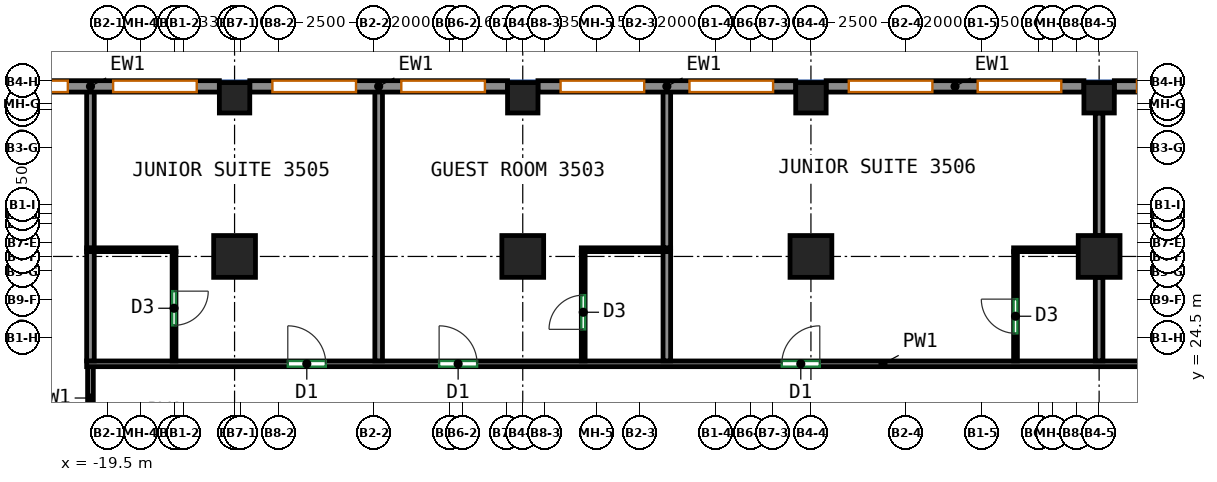
"""IFC4 building model, lengths in metres.
Left out: names, types, materials, properties, quantities, classifications, styles, units other than length and angle.
Written with IfcOpenShell. Run it as: python <this file> out.ifc"""

import sys

from ifc_helpers import new_model, si_unit, direction, frame, frame_2d, origin, origin_2d, place, context, subcontext, project, spatial, rectangle, extrude, source, transform, mapped, element, fill, save


model = new_model("IFC4")
c1 = context("Model", 3, precision=1e-05, world=origin(), true_north=direction((0.0, 1.0)))
c2 = subcontext(c1, "Body", "Model", "MODEL_VIEW")
j1 = project(units=[si_unit("LENGTHUNIT", "METRE"), si_unit("PLANEANGLEUNIT", "RADIAN")], contexts=[c1])
p1 = place(None, origin())
s1 = spatial("IfcSite", under=j1, at=p1, CompositionType="ELEMENT")
p2 = place(p1, origin())
s2 = spatial("IfcBuilding", under=s1, at=p2, CompositionType="ELEMENT")
p3 = place(p2, frame((0.0, 0.0, 154.1)))
s3 = spatial("IfcBuildingStorey", under=s2, at=p3, CompositionType="ELEMENT", Elevation=154.1)
m1 = source(origin(), c2, "Body", "SweptSolid", [
    extrude(rectangle(XDim=1.1, YDim=1.1, at=origin_2d()), origin(), (0.0, 0.0, 1.0), 3.12),
])
p4 = place(p3, frame((-16.167, 26.625, 0.0), z_axis=(0.0, 0.0, 1.0), x_axis=(1.0, 0.0, 0.0)))
e1 = element("IfcColumn", 1, at=p4, inside=s3, PredefinedType="COLUMN", context=c2, shape_type="MappedRepresentation", body=[
    mapped(m1, transform((0.0, 0.0, 0.0))),
])
m2 = source(origin(), c2, "Body", "SweptSolid", [
    extrude(rectangle(XDim=0.8, YDim=0.8, at=origin_2d()), origin(), (0.0, 0.0, 1.0), 3.12),
])
p5 = place(p3, frame((-16.167, 30.8, 0.0), z_axis=(0.0, 0.0, 1.0), x_axis=(1.0, 0.0, 0.0)))
e2 = element("IfcColumn", 2, at=p5, inside=s3, PredefinedType="COLUMN", context=c2, shape_type="MappedRepresentation", body=[
    mapped(m2, transform((0.0, 0.0, 0.0))),
])
p6 = place(p3, frame((-8.583, 26.625, 0.0), z_axis=(0.0, 0.0, 1.0), x_axis=(1.0, 0.0, 0.0)))
e3 = element("IfcColumn", 3, at=p6, inside=s3, PredefinedType="COLUMN", context=c2, shape_type="MappedRepresentation", body=[
    mapped(m1, transform((0.0, 0.0, 0.0))),
])
p7 = place(p3, frame((-8.583, 30.8, 0.0), z_axis=(0.0, 0.0, 1.0), x_axis=(1.0, 0.0, 0.0)))
e4 = element("IfcColumn", 4, at=p7, inside=s3, PredefinedType="COLUMN", context=c2, shape_type="MappedRepresentation", body=[
    mapped(m2, transform((0.0, 0.0, 0.0))),
])
p8 = place(p3, frame((-1.0, 26.625, 0.0), z_axis=(0.0, 0.0, 1.0), x_axis=(1.0, 0.0, 0.0)))
e5 = element("IfcColumn", 5, at=p8, inside=s3, PredefinedType="COLUMN", context=c2, shape_type="MappedRepresentation", body=[
    mapped(m1, transform((0.0, 0.0, 0.0))),
])
p9 = place(p3, frame((-1.0, 30.8, 0.0), z_axis=(0.0, 0.0, 1.0), x_axis=(1.0, 0.0, 0.0)))
e6 = element("IfcColumn", 6, at=p9, inside=s3, PredefinedType="COLUMN", context=c2, shape_type="MappedRepresentation", body=[
    mapped(m2, transform((0.0, 0.0, 0.0))),
])
p10 = place(p3, frame((6.583, 26.625, 0.0), z_axis=(0.0, 0.0, 1.0), x_axis=(1.0, 0.0, 0.0)))
e7 = element("IfcColumn", 7, at=p10, inside=s3, PredefinedType="COLUMN", context=c2, shape_type="MappedRepresentation", body=[
    mapped(m1, transform((0.0, 0.0, 0.0))),
])
p11 = place(p3, frame((6.583, 30.8, 0.0), z_axis=(0.0, 0.0, 1.0), x_axis=(1.0, 0.0, 0.0)))
e8 = element("IfcColumn", 8, at=p11, inside=s3, PredefinedType="COLUMN", context=c2, shape_type="MappedRepresentation", body=[
    mapped(m2, transform((0.0, 0.0, 0.0))),
])
m3 = source(origin(), c2, "Body", "SweptSolid", [
    extrude(rectangle(XDim=6.783, YDim=0.3, at=frame_2d((3.392, 0.0))), origin(), (0.0, 0.0, 1.0), 3.12),
])
p12 = place(p3, frame((13.767, 31.1, 0.0), z_axis=(0.0, 0.0, 1.0), x_axis=(-1.0, 0.0, 0.0)))
e9 = element("IfcWall", 9, at=p12, inside=s3, PredefinedType="SOLIDWALL", context=c2, shape_type="MappedRepresentation", body=[
    mapped(m3, transform((0.0, 0.0, 0.0))),
])
p13 = place(p12, frame((0.596, 0.0, 0.85)))
e10 = element("IfcOpeningElement", 10, at=p13, cuts=e9, PredefinedType="OPENING", context=c2, shape_type="SweptSolid", body=[
    extrude(rectangle(XDim=2.2, YDim=1.95, at=frame_2d((1.1, 0.975))), frame((0.0, 0.16, 0.0), z_axis=(0.0, -1.0, 0.0), x_axis=(1.0, 0.0, 0.0)), (0.0, 0.0, 1.0), 0.32),
])
p14 = place(p12, frame((3.988, 0.0, 0.85)))
e11 = element("IfcOpeningElement", 11, at=p14, cuts=e9, PredefinedType="OPENING", context=c2, shape_type="SweptSolid", body=[
    extrude(rectangle(XDim=2.2, YDim=1.95, at=frame_2d((1.1, 0.975))), frame((0.0, 0.16, 0.0), z_axis=(0.0, -1.0, 0.0), x_axis=(1.0, 0.0, 0.0)), (0.0, 0.0, 1.0), 0.32),
])
m4 = source(origin(), c2, "Body", "SweptSolid", [
    extrude(rectangle(XDim=6.783, YDim=0.3, at=frame_2d((3.392, 0.0))), origin(), (0.0, 0.0, 1.0), 3.12),
])
p15 = place(p3, frame((6.183, 31.1, 0.0), z_axis=(0.0, 0.0, 1.0), x_axis=(-1.0, 0.0, 0.0)))
e12 = element("IfcWall", 12, at=p15, inside=s3, PredefinedType="SOLIDWALL", context=c2, shape_type="MappedRepresentation", body=[
    mapped(m4, transform((0.0, 0.0, 0.0))),
])
p16 = place(p15, frame((0.596, 0.0, 0.85)))
e13 = element("IfcOpeningElement", 13, at=p16, cuts=e12, PredefinedType="OPENING", context=c2, shape_type="SweptSolid", body=[
    extrude(rectangle(XDim=2.2, YDim=1.95, at=frame_2d((1.1, 0.975))), frame((0.0, 0.16, 0.0), z_axis=(0.0, -1.0, 0.0), x_axis=(1.0, 0.0, 0.0)), (0.0, 0.0, 1.0), 0.32),
])
p17 = place(p15, frame((3.988, 0.0, 0.85)))
e14 = element("IfcOpeningElement", 14, at=p17, cuts=e12, PredefinedType="OPENING", context=c2, shape_type="SweptSolid", body=[
    extrude(rectangle(XDim=2.2, YDim=1.95, at=frame_2d((1.1, 0.975))), frame((0.0, 0.16, 0.0), z_axis=(0.0, -1.0, 0.0), x_axis=(1.0, 0.0, 0.0)), (0.0, 0.0, 1.0), 0.32),
])
p18 = place(p3, frame((-1.4, 31.1, 0.0), z_axis=(0.0, 0.0, 1.0), x_axis=(-1.0, 0.0, 0.0)))
e15 = element("IfcWall", 15, at=p18, inside=s3, PredefinedType="SOLIDWALL", context=c2, shape_type="MappedRepresentation", body=[
    mapped(m4, transform((0.0, 0.0, 0.0))),
])
p19 = place(p18, frame((0.596, 0.0, 0.85)))
e16 = element("IfcOpeningElement", 16, at=p19, cuts=e15, PredefinedType="OPENING", context=c2, shape_type="SweptSolid", body=[
    extrude(rectangle(XDim=2.2, YDim=1.95, at=frame_2d((1.1, 0.975))), frame((0.0, 0.16, 0.0), z_axis=(0.0, -1.0, 0.0), x_axis=(1.0, 0.0, 0.0)), (0.0, 0.0, 1.0), 0.32),
])
p20 = place(p18, frame((3.988, 0.0, 0.85)))
e17 = element("IfcOpeningElement", 17, at=p20, cuts=e15, PredefinedType="OPENING", context=c2, shape_type="SweptSolid", body=[
    extrude(rectangle(XDim=2.2, YDim=1.95, at=frame_2d((1.1, 0.975))), frame((0.0, 0.16, 0.0), z_axis=(0.0, -1.0, 0.0), x_axis=(1.0, 0.0, 0.0)), (0.0, 0.0, 1.0), 0.32),
])
p21 = place(p3, frame((-8.983, 31.1, 0.0), z_axis=(0.0, 0.0, 1.0), x_axis=(-1.0, 0.0, 0.0)))
e18 = element("IfcWall", 18, at=p21, inside=s3, PredefinedType="SOLIDWALL", context=c2, shape_type="MappedRepresentation", body=[
    mapped(m3, transform((0.0, 0.0, 0.0))),
])
p22 = place(p21, frame((0.596, 0.0, 0.85)))
e19 = element("IfcOpeningElement", 19, at=p22, cuts=e18, PredefinedType="OPENING", context=c2, shape_type="SweptSolid", body=[
    extrude(rectangle(XDim=2.2, YDim=1.95, at=frame_2d((1.1, 0.975))), frame((0.0, 0.16, 0.0), z_axis=(0.0, -1.0, 0.0), x_axis=(1.0, 0.0, 0.0)), (0.0, 0.0, 1.0), 0.32),
])
p23 = place(p21, frame((3.988, 0.0, 0.85)))
e20 = element("IfcOpeningElement", 20, at=p23, cuts=e18, PredefinedType="OPENING", context=c2, shape_type="SweptSolid", body=[
    extrude(rectangle(XDim=2.2, YDim=1.95, at=frame_2d((1.1, 0.975))), frame((0.0, 0.16, 0.0), z_axis=(0.0, -1.0, 0.0), x_axis=(1.0, 0.0, 0.0)), (0.0, 0.0, 1.0), 0.32),
])
p24 = place(p3, frame((-16.567, 31.1, 0.0), z_axis=(0.0, 0.0, 1.0), x_axis=(-1.0, 0.0, 0.0)))
e21 = element("IfcWall", 21, at=p24, inside=s3, PredefinedType="SOLIDWALL", context=c2, shape_type="MappedRepresentation", body=[
    mapped(m4, transform((0.0, 0.0, 0.0))),
])
p25 = place(p24, frame((0.596, 0.0, 0.85)))
e22 = element("IfcOpeningElement", 22, at=p25, cuts=e21, PredefinedType="OPENING", context=c2, shape_type="SweptSolid", body=[
    extrude(rectangle(XDim=2.2, YDim=1.95, at=frame_2d((1.1, 0.975))), frame((0.0, 0.16, 0.0), z_axis=(0.0, -1.0, 0.0), x_axis=(1.0, 0.0, 0.0)), (0.0, 0.0, 1.0), 0.32),
])
p26 = place(p24, frame((3.988, 0.0, 0.85)))
e23 = element("IfcOpeningElement", 23, at=p26, cuts=e21, PredefinedType="OPENING", context=c2, shape_type="SweptSolid", body=[
    extrude(rectangle(XDim=2.2, YDim=1.95, at=frame_2d((1.1, 0.975))), frame((0.0, 0.16, 0.0), z_axis=(0.0, -1.0, 0.0), x_axis=(1.0, 0.0, 0.0)), (0.0, 0.0, 1.0), 0.32),
])
p27 = place(p3, frame((-19.959, 22.075, 0.0), z_axis=(0.0, 0.0, 1.0), x_axis=(0.0, 1.0, 0.0)))
e24 = element("IfcWall", 24, at=p27, inside=s3, PredefinedType="PARTITIONING", context=c2, shape_type="SweptSolid", body=[
    extrude(rectangle(XDim=1.65, YDim=0.15, at=frame_2d((0.825, 0.0))), origin(), (0.0, 0.0, 1.0), 3.12),
])
p28 = place(p3, frame((-20.059, 23.8, 0.0), z_axis=(0.0, 0.0, 1.0), x_axis=(1.0, 0.0, 0.0)))
e25 = element("IfcWall", 25, at=p28, inside=s3, PredefinedType="PARTITIONING", context=c2, shape_type="SweptSolid", body=[
    extrude(rectangle(XDim=41.909, YDim=0.15, at=frame_2d((20.955, 0.0))), origin(), (0.0, 0.0, 1.0), 3.12),
])
p29 = place(p28, frame((5.293, 0.0, 0.0)))
e26 = element("IfcOpeningElement", 26, at=p29, cuts=e25, PredefinedType="OPENING", context=c2, shape_type="SweptSolid", body=[
    extrude(rectangle(XDim=1.0, YDim=2.1, at=frame_2d((0.5, 1.05))), frame((0.0, 0.085, 0.0), z_axis=(0.0, -1.0, 0.0), x_axis=(1.0, 0.0, 0.0)), (0.0, 0.0, 1.0), 0.17),
])
p30 = place(p28, frame((9.275, 0.0, 0.0)))
e27 = element("IfcOpeningElement", 27, at=p30, cuts=e25, PredefinedType="OPENING", context=c2, shape_type="SweptSolid", body=[
    extrude(rectangle(XDim=1.0, YDim=2.1, at=frame_2d((0.5, 1.05))), frame((0.0, 0.085, 0.0), z_axis=(0.0, -1.0, 0.0), x_axis=(1.0, 0.0, 0.0)), (0.0, 0.0, 1.0), 0.17),
])
p31 = place(p28, frame((18.292, 0.0, 0.0)))
e28 = element("IfcOpeningElement", 28, at=p31, cuts=e25, PredefinedType="OPENING", context=c2, shape_type="SweptSolid", body=[
    extrude(rectangle(XDim=1.0, YDim=2.1, at=frame_2d((0.5, 1.05))), frame((0.0, 0.085, 0.0), z_axis=(0.0, -1.0, 0.0), x_axis=(1.0, 0.0, 0.0)), (0.0, 0.0, 1.0), 0.17),
])
p32 = place(p28, frame((30.636, 0.0, 0.0)))
e29 = element("IfcOpeningElement", 29, at=p32, cuts=e25, PredefinedType="OPENING", context=c2, shape_type="SweptSolid", body=[
    extrude(rectangle(XDim=1.0, YDim=2.1, at=frame_2d((0.5, 1.05))), frame((0.0, 0.085, 0.0), z_axis=(0.0, -1.0, 0.0), x_axis=(1.0, 0.0, 0.0)), (0.0, 0.0, 1.0), 0.17),
])
p33 = place(p28, frame((36.828, 0.0, 0.0)))
e30 = element("IfcOpeningElement", 30, at=p33, cuts=e25, PredefinedType="OPENING", context=c2, shape_type="SweptSolid", body=[
    extrude(rectangle(XDim=1.0, YDim=2.1, at=frame_2d((0.5, 1.05))), frame((0.0, 0.085, 0.0), z_axis=(0.0, -1.0, 0.0), x_axis=(1.0, 0.0, 0.0)), (0.0, 0.0, 1.0), 0.17),
])
p34 = place(p28, frame((38.314, 0.0, 0.0)))
e31 = element("IfcOpeningElement", 31, at=p34, cuts=e25, PredefinedType="OPENING", context=c2, shape_type="SweptSolid", body=[
    extrude(rectangle(XDim=1.0, YDim=2.1, at=frame_2d((0.5, 1.05))), frame((0.0, 0.085, 0.0), z_axis=(0.0, -1.0, 0.0), x_axis=(1.0, 0.0, 0.0)), (0.0, 0.0, 1.0), 0.17),
])
p35 = place(p3, frame((-19.959, 26.842, 0.0), z_axis=(0.0, 0.0, 1.0), x_axis=(0.0, 1.0, 0.0)))
e32 = element("IfcWall", 32, at=p35, inside=s3, PredefinedType="PARTITIONING", context=c2, shape_type="SweptSolid", body=[
    extrude(rectangle(XDim=4.158, YDim=0.2, at=frame_2d((2.079, 0.0))), origin(), (0.0, 0.0, 1.0), 3.12),
])
p36 = place(p3, frame((-19.959, 23.877, 0.0), z_axis=(0.0, 0.0, 1.0), x_axis=(0.0, 1.0, 0.0)))
e33 = element("IfcWall", 33, at=p36, inside=s3, PredefinedType="PARTITIONING", context=c2, shape_type="SweptSolid", body=[
    extrude(rectangle(XDim=2.885, YDim=0.2, at=frame_2d((1.442, 0.0))), origin(), (0.0, 0.0, 1.0), 3.12),
])
p37 = place(p3, frame((-17.759, 26.752, 0.0), z_axis=(0.0, 0.0, 1.0), x_axis=(0.0, -1.0, 0.0)))
e34 = element("IfcWall", 34, at=p37, inside=s3, PredefinedType="PARTITIONING", context=c2, shape_type="SweptSolid", body=[
    extrude(rectangle(XDim=2.875, YDim=0.1, at=frame_2d((1.438, 0.0))), origin(), (0.0, 0.0, 1.0), 3.12),
])
p38 = place(p37, frame((1.04, 0.0, 0.0)))
e35 = element("IfcOpeningElement", 35, at=p38, cuts=e34, PredefinedType="OPENING", context=c2, shape_type="SweptSolid", body=[
    extrude(rectangle(XDim=0.9, YDim=2.1, at=frame_2d((0.45, 1.05))), frame((0.0, 0.06, 0.0), z_axis=(0.0, -1.0, 0.0), x_axis=(1.0, 0.0, 0.0)), (0.0, 0.0, 1.0), 0.12),
])
p39 = place(p3, frame((-20.059, 26.802, 0.0), z_axis=(0.0, 0.0, 1.0), x_axis=(1.0, 0.0, 0.0)))
e36 = element("IfcWall", 36, at=p39, inside=s3, PredefinedType="PARTITIONING", context=c2, shape_type="SweptSolid", body=[
    extrude(rectangle(XDim=2.35, YDim=0.1, at=frame_2d((1.175, 0.0))), origin(), (0.0, 0.0, 1.0), 3.12),
])
p40 = place(p3, frame((-12.375, 23.877, 0.0), z_axis=(0.0, 0.0, 1.0), x_axis=(0.0, 1.0, 0.0)))
e37 = element("IfcWall", 37, at=p40, inside=s3, PredefinedType="PARTITIONING", context=c2, shape_type="SweptSolid", body=[
    extrude(rectangle(XDim=7.123, YDim=0.2, at=frame_2d((3.562, 0.0))), origin(), (0.0, 0.0, 1.0), 3.12),
])
p41 = place(p3, frame((-7.042, 26.802, 0.0), z_axis=(0.0, 0.0, 1.0), x_axis=(1.0, 0.0, 0.0)))
e38 = element("IfcWall", 38, at=p41, inside=s3, PredefinedType="PARTITIONING", context=c2, shape_type="SweptSolid", body=[
    extrude(rectangle(XDim=2.35, YDim=0.1, at=frame_2d((1.175, 0.0))), origin(), (0.0, 0.0, 1.0), 3.12),
])
p42 = place(p3, frame((-6.992, 23.877, 0.0), z_axis=(0.0, 0.0, 1.0), x_axis=(0.0, 1.0, 0.0)))
e39 = element("IfcWall", 39, at=p42, inside=s3, PredefinedType="PARTITIONING", context=c2, shape_type="SweptSolid", body=[
    extrude(rectangle(XDim=2.875, YDim=0.1, at=frame_2d((1.438, 0.0))), origin(), (0.0, 0.0, 1.0), 3.12),
])
p43 = place(p42, frame((0.83, 0.0, 0.0)))
e40 = element("IfcOpeningElement", 40, at=p43, cuts=e39, PredefinedType="OPENING", context=c2, shape_type="SweptSolid", body=[
    extrude(rectangle(XDim=0.9, YDim=2.1, at=frame_2d((0.45, 1.05))), frame((0.0, 0.06, 0.0), z_axis=(0.0, -1.0, 0.0), x_axis=(1.0, 0.0, 0.0)), (0.0, 0.0, 1.0), 0.12),
])
p44 = place(p3, frame((-4.792, 26.852, 0.0), z_axis=(0.0, 0.0, 1.0), x_axis=(0.0, 1.0, 0.0)))
e41 = element("IfcWall", 41, at=p44, inside=s3, PredefinedType="PARTITIONING", context=c2, shape_type="SweptSolid", body=[
    extrude(rectangle(XDim=4.148, YDim=0.2, at=frame_2d((2.074, 0.0))), origin(), (0.0, 0.0, 1.0), 3.12),
])
p45 = place(p3, frame((-4.792, 23.877, 0.0), z_axis=(0.0, 0.0, 1.0), x_axis=(0.0, 1.0, 0.0)))
e42 = element("IfcWall", 42, at=p45, inside=s3, PredefinedType="PARTITIONING", context=c2, shape_type="SweptSolid", body=[
    extrude(rectangle(XDim=2.875, YDim=0.2, at=frame_2d((1.438, 0.0))), origin(), (0.0, 0.0, 1.0), 3.12),
])
p46 = place(p3, frame((4.333, 26.802, 0.0), z_axis=(0.0, 0.0, 1.0), x_axis=(1.0, 0.0, 0.0)))
e43 = element("IfcWall", 43, at=p46, inside=s3, PredefinedType="PARTITIONING", context=c2, shape_type="SweptSolid", body=[
    extrude(rectangle(XDim=1.7, YDim=0.1, at=frame_2d((0.85, 0.0))), origin(), (0.0, 0.0, 1.0), 3.12),
])
p47 = place(p3, frame((4.383, 23.877, 0.0), z_axis=(0.0, 0.0, 1.0), x_axis=(0.0, 1.0, 0.0)))
e44 = element("IfcWall", 44, at=p47, inside=s3, PredefinedType="PARTITIONING", context=c2, shape_type="SweptSolid", body=[
    extrude(rectangle(XDim=2.875, YDim=0.1, at=frame_2d((1.438, 0.0))), origin(), (0.0, 0.0, 1.0), 3.12),
])
p48 = place(p47, frame((0.725, 0.0, 0.0)))
e45 = element("IfcOpeningElement", 45, at=p48, cuts=e44, PredefinedType="OPENING", context=c2, shape_type="SweptSolid", body=[
    extrude(rectangle(XDim=0.9, YDim=2.1, at=frame_2d((0.45, 1.05))), frame((0.0, 0.06, 0.0), z_axis=(0.0, -1.0, 0.0), x_axis=(1.0, 0.0, 0.0)), (0.0, 0.0, 1.0), 0.12),
])
p49 = place(p3, frame((6.583, 27.175, 0.0), z_axis=(0.0, 0.0, 1.0), x_axis=(0.0, 1.0, 0.0)))
e46 = element("IfcWall", 46, at=p49, inside=s3, PredefinedType="PARTITIONING", context=c2, shape_type="SweptSolid", body=[
    extrude(rectangle(XDim=3.225, YDim=0.2, at=frame_2d((1.612, 0.0))), origin(), (0.0, 0.0, 1.0), 3.12),
])
p50 = place(p3, frame((6.583, 23.877, 0.0), z_axis=(0.0, 0.0, 1.0), x_axis=(0.0, 1.0, 0.0)))
e47 = element("IfcWall", 47, at=p50, inside=s3, PredefinedType="PARTITIONING", context=c2, shape_type="SweptSolid", body=[
    extrude(rectangle(XDim=2.198, YDim=0.2, at=frame_2d((1.099, 0.0))), origin(), (0.0, 0.0, 1.0), 3.12),
])
p51 = place(p14, origin())
e48 = element("IfcWindow", 48, at=p51, inside=s3, PartitioningType="SINGLE_PANEL", PredefinedType="WINDOW", context=c2, shape_type="SweptSolid", body=[
    extrude(rectangle(XDim=2.2, YDim=1.95, at=frame_2d((1.1, 0.975))), frame((0.0, 0.03, 0.0), z_axis=(0.0, -1.0, 0.0), x_axis=(1.0, 0.0, 0.0)), (0.0, 0.0, 1.0), 0.06),
])
fill(e11, e48)
p52 = place(p16, origin())
e49 = element("IfcWindow", 49, at=p52, inside=s3, PartitioningType="SINGLE_PANEL", PredefinedType="WINDOW", context=c2, shape_type="SweptSolid", body=[
    extrude(rectangle(XDim=2.2, YDim=1.95, at=frame_2d((1.1, 0.975))), frame((0.0, 0.03, 0.0), z_axis=(0.0, -1.0, 0.0), x_axis=(1.0, 0.0, 0.0)), (0.0, 0.0, 1.0), 0.06),
])
fill(e13, e49)
p53 = place(p17, origin())
e50 = element("IfcWindow", 50, at=p53, inside=s3, PartitioningType="SINGLE_PANEL", PredefinedType="WINDOW", context=c2, shape_type="SweptSolid", body=[
    extrude(rectangle(XDim=2.2, YDim=1.95, at=frame_2d((1.1, 0.975))), frame((0.0, 0.03, 0.0), z_axis=(0.0, -1.0, 0.0), x_axis=(1.0, 0.0, 0.0)), (0.0, 0.0, 1.0), 0.06),
])
fill(e14, e50)
p54 = place(p19, origin())
e51 = element("IfcWindow", 51, at=p54, inside=s3, PartitioningType="SINGLE_PANEL", PredefinedType="WINDOW", context=c2, shape_type="SweptSolid", body=[
    extrude(rectangle(XDim=2.2, YDim=1.95, at=frame_2d((1.1, 0.975))), frame((0.0, 0.03, 0.0), z_axis=(0.0, -1.0, 0.0), x_axis=(1.0, 0.0, 0.0)), (0.0, 0.0, 1.0), 0.06),
])
fill(e16, e51)
p55 = place(p20, origin())
e52 = element("IfcWindow", 52, at=p55, inside=s3, PartitioningType="SINGLE_PANEL", PredefinedType="WINDOW", context=c2, shape_type="SweptSolid", body=[
    extrude(rectangle(XDim=2.2, YDim=1.95, at=frame_2d((1.1, 0.975))), frame((0.0, 0.03, 0.0), z_axis=(0.0, -1.0, 0.0), x_axis=(1.0, 0.0, 0.0)), (0.0, 0.0, 1.0), 0.06),
])
fill(e17, e52)
p56 = place(p22, origin())
e53 = element("IfcWindow", 53, at=p56, inside=s3, PartitioningType="SINGLE_PANEL", PredefinedType="WINDOW", context=c2, shape_type="SweptSolid", body=[
    extrude(rectangle(XDim=2.2, YDim=1.95, at=frame_2d((1.1, 0.975))), frame((0.0, 0.03, 0.0), z_axis=(0.0, -1.0, 0.0), x_axis=(1.0, 0.0, 0.0)), (0.0, 0.0, 1.0), 0.06),
])
fill(e19, e53)
p57 = place(p23, origin())
e54 = element("IfcWindow", 54, at=p57, inside=s3, PartitioningType="SINGLE_PANEL", PredefinedType="WINDOW", context=c2, shape_type="SweptSolid", body=[
    extrude(rectangle(XDim=2.2, YDim=1.95, at=frame_2d((1.1, 0.975))), frame((0.0, 0.03, 0.0), z_axis=(0.0, -1.0, 0.0), x_axis=(1.0, 0.0, 0.0)), (0.0, 0.0, 1.0), 0.06),
])
fill(e20, e54)
p58 = place(p25, origin())
e55 = element("IfcWindow", 55, at=p58, inside=s3, PartitioningType="SINGLE_PANEL", PredefinedType="WINDOW", context=c2, shape_type="SweptSolid", body=[
    extrude(rectangle(XDim=2.2, YDim=1.95, at=frame_2d((1.1, 0.975))), frame((0.0, 0.03, 0.0), z_axis=(0.0, -1.0, 0.0), x_axis=(1.0, 0.0, 0.0)), (0.0, 0.0, 1.0), 0.06),
])
fill(e22, e55)
p59 = place(p26, origin())
e56 = element("IfcWindow", 56, at=p59, inside=s3, PartitioningType="SINGLE_PANEL", PredefinedType="WINDOW", context=c2, shape_type="SweptSolid", body=[
    extrude(rectangle(XDim=2.2, YDim=1.95, at=frame_2d((1.1, 0.975))), frame((0.0, 0.03, 0.0), z_axis=(0.0, -1.0, 0.0), x_axis=(1.0, 0.0, 0.0)), (0.0, 0.0, 1.0), 0.06),
])
fill(e23, e56)
p60 = place(p29, origin())
e57 = element("IfcDoor", 57, at=p60, inside=s3, OperationType="SINGLE_SWING_LEFT", PredefinedType="DOOR", context=c2, shape_type="SweptSolid", body=[
    extrude(rectangle(XDim=1.0, YDim=2.1, at=frame_2d((0.5, 1.05))), frame((0.0, 0.025, 0.0), z_axis=(0.0, -1.0, 0.0), x_axis=(1.0, 0.0, 0.0)), (0.0, 0.0, 1.0), 0.05),
])
fill(e26, e57)
p61 = place(p30, origin())
e58 = element("IfcDoor", 58, at=p61, inside=s3, OperationType="SINGLE_SWING_LEFT", PredefinedType="DOOR", context=c2, shape_type="SweptSolid", body=[
    extrude(rectangle(XDim=1.0, YDim=2.1, at=frame_2d((0.5, 1.05))), frame((0.0, 0.025, 0.0), z_axis=(0.0, -1.0, 0.0), x_axis=(1.0, 0.0, 0.0)), (0.0, 0.0, 1.0), 0.05),
])
fill(e27, e58)
p62 = place(p31, origin())
e59 = element("IfcDoor", 59, at=p62, inside=s3, OperationType="SINGLE_SWING_RIGHT", PredefinedType="DOOR", context=c2, shape_type="SweptSolid", body=[
    extrude(rectangle(XDim=1.0, YDim=2.1, at=frame_2d((0.5, 1.05))), frame((0.0, 0.025, 0.0), z_axis=(0.0, -1.0, 0.0), x_axis=(1.0, 0.0, 0.0)), (0.0, 0.0, 1.0), 0.05),
])
fill(e28, e59)
p63 = place(p48, origin())
e60 = element("IfcDoor", 60, at=p63, inside=s3, OperationType="SINGLE_SWING_RIGHT", PredefinedType="DOOR", context=c2, shape_type="SweptSolid", body=[
    extrude(rectangle(XDim=0.9, YDim=2.1, at=frame_2d((0.45, 1.05))), frame((0.0, 0.025, 0.0), z_axis=(0.0, -1.0, 0.0), x_axis=(1.0, 0.0, 0.0)), (0.0, 0.0, 1.0), 0.05),
])
fill(e45, e60)
p64 = place(p43, origin())
e61 = element("IfcDoor", 61, at=p64, inside=s3, OperationType="SINGLE_SWING_LEFT", PredefinedType="DOOR", context=c2, shape_type="SweptSolid", body=[
    extrude(rectangle(XDim=0.9, YDim=2.1, at=frame_2d((0.45, 1.05))), frame((0.0, 0.025, 0.0), z_axis=(0.0, -1.0, 0.0), x_axis=(1.0, 0.0, 0.0)), (0.0, 0.0, 1.0), 0.05),
])
fill(e40, e61)
p65 = place(p38, origin())
e62 = element("IfcDoor", 62, at=p65, inside=s3, OperationType="SINGLE_SWING_LEFT", PredefinedType="DOOR", context=c2, shape_type="SweptSolid", body=[
    extrude(rectangle(XDim=0.9, YDim=2.1, at=frame_2d((0.45, 1.05))), frame((0.0, 0.025, 0.0), z_axis=(0.0, -1.0, 0.0), x_axis=(1.0, 0.0, 0.0)), (0.0, 0.0, 1.0), 0.05),
])
fill(e35, e62)
save(model, sys.argv[1])
